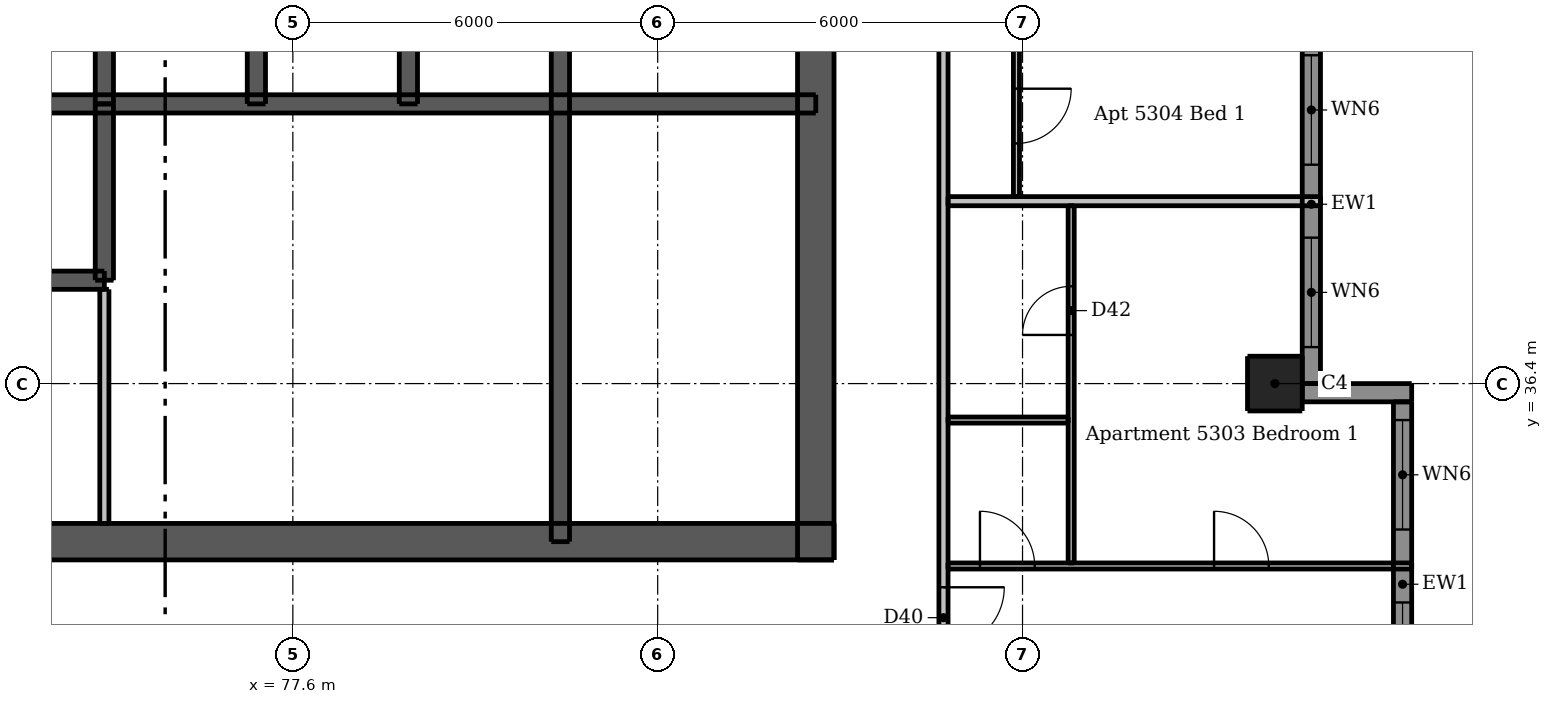
"""IFC4 building model, lengths in metres.
Left out: names, types, materials, properties, quantities, classifications, styles, units other than length and angle.
Written with IfcOpenShell. Run it as: python <this file> out.ifc"""

import sys

from ifc_helpers import new_model, si_unit, direction, frame, frame_2d, origin, origin_2d, place, context, subcontext, project, spatial, rectangle, extrude, element, fill, save


model = new_model("IFC4")
c1 = context("Model", 3, precision=1e-05, world=origin(), true_north=direction((0.0, 1.0)))
c2 = subcontext(c1, "Body", "Model", "MODEL_VIEW")
j1 = project(units=[si_unit("LENGTHUNIT", "METRE"), si_unit("PLANEANGLEUNIT", "RADIAN")], contexts=[c1])
p1 = place(None, origin())
s1 = spatial("IfcSite", under=j1, at=p1, CompositionType="ELEMENT")
p2 = place(p1, origin())
s2 = spatial("IfcBuilding", under=s1, at=p2, CompositionType="ELEMENT")
p3 = place(p2, frame((0.0, 0.0, 200.2)))
s3 = spatial("IfcBuildingStorey", under=s2, at=p3, CompositionType="ELEMENT", Elevation=200.2)
p4 = place(p3, frame((62.5, 33.8, 0.0), z_axis=(0.0, 0.0, 1.0), x_axis=(1.0, 0.0, 0.0)))
e1 = element("IfcWall", 1, at=p4, inside=s3, PredefinedType="SHEAR", context=c2, shape_type="SweptSolid", body=[
    extrude(rectangle(XDim=24.0, YDim=0.6, at=frame_2d((12.0, 0.0))), origin(), (0.0, 0.0, 1.0), 3.05),
])
p5 = place(p4, frame((1.925, 0.0, 0.0)))
e2 = element("IfcOpeningElement", 2, at=p5, cuts=e1, PredefinedType="OPENING", context=c2, shape_type="SweptSolid", body=[
    extrude(rectangle(XDim=1.1, YDim=2.1, at=frame_2d((0.55, 1.05))), frame((0.0, 0.31, 0.0), z_axis=(0.0, -1.0, 0.0), x_axis=(1.0, 0.0, 0.0)), (0.0, 0.0, 1.0), 0.62),
])
p6 = place(p4, frame((20.975, 0.0, 0.0)))
e3 = element("IfcOpeningElement", 3, at=p6, cuts=e1, PredefinedType="OPENING", context=c2, shape_type="SweptSolid", body=[
    extrude(rectangle(XDim=1.1, YDim=2.1, at=frame_2d((0.55, 1.05))), frame((0.0, 0.31, 0.0), z_axis=(0.0, -1.0, 0.0), x_axis=(1.0, 0.0, 0.0)), (0.0, 0.0, 1.0), 0.62),
])
p7 = place(p4, frame((8.0, 0.0, 0.0)))
e4 = element("IfcOpeningElement", 4, at=p7, cuts=e1, PredefinedType="OPENING", context=c2, shape_type="SweptSolid", body=[
    extrude(rectangle(XDim=1.1, YDim=2.1, at=frame_2d((0.55, 1.05))), frame((0.0, 0.31, 0.0), z_axis=(0.0, -1.0, 0.0), x_axis=(1.0, 0.0, 0.0)), (0.0, 0.0, 1.0), 0.62),
])
p8 = place(p4, frame((15.3, 0.0, 0.0)))
e5 = element("IfcOpeningElement", 5, at=p8, cuts=e1, PredefinedType="OPENING", context=c2, shape_type="SweptSolid", body=[
    extrude(rectangle(XDim=0.9, YDim=2.1, at=frame_2d((0.45, 1.05))), frame((0.0, 0.31, 0.0), z_axis=(0.0, -1.0, 0.0), x_axis=(1.0, 0.0, 0.0)), (0.0, 0.0, 1.0), 0.62),
])
p9 = place(p3, frame((86.2, 33.5, 0.0), z_axis=(0.0, 0.0, 1.0), x_axis=(0.0, 1.0, 0.0)))
e6 = element("IfcWall", 6, at=p9, inside=s3, PredefinedType="SHEAR", context=c2, shape_type="SweptSolid", body=[
    extrude(rectangle(XDim=24.0, YDim=0.6, at=frame_2d((12.0, 0.0))), origin(), (0.0, 0.0, 1.0), 3.05),
])
p10 = place(p9, frame((11.2, 0.0, 0.0)))
e7 = element("IfcOpeningElement", 7, at=p10, cuts=e6, PredefinedType="OPENING", context=c2, shape_type="SweptSolid", body=[
    extrude(rectangle(XDim=1.6, YDim=2.1, at=frame_2d((0.8, 1.05))), frame((0.0, 0.31, 0.0), z_axis=(0.0, -1.0, 0.0), x_axis=(1.0, 0.0, 0.0)), (0.0, 0.0, 1.0), 0.62),
])
p11 = place(p3, frame((62.8, 41.0, 0.0), z_axis=(0.0, 0.0, 1.0), x_axis=(1.0, 0.0, 0.0)))
e8 = element("IfcWall", 8, at=p11, inside=s3, PredefinedType="SHEAR", context=c2, shape_type="SweptSolid", body=[
    extrude(rectangle(XDim=23.4, YDim=0.3, at=frame_2d((11.7, 0.0))), origin(), (0.0, 0.0, 1.0), 3.05),
])
p12 = place(p3, frame((82.0, 33.8, 0.0), z_axis=(0.0, 0.0, 1.0), x_axis=(0.0, 1.0, 0.0)))
e9 = element("IfcWall", 9, at=p12, inside=s3, PredefinedType="SHEAR", context=c2, shape_type="SweptSolid", body=[
    extrude(rectangle(XDim=10.1, YDim=0.3, at=frame_2d((5.05, 0.0))), origin(), (0.0, 0.0, 1.0), 3.05),
])
for number, where, z_axis, x_axis in (
    (10, (74.5, 41.0, 0.0), (0.0, 0.0, 1.0), (0.0, 1.0, 0.0)),
    (11, (77.0, 41.0, 0.0), (0.0, 0.0, 1.0), (0.0, 1.0, 0.0)),
    (12, (79.5, 41.0, 0.0), (0.0, 0.0, 1.0), (0.0, 1.0, 0.0)),
):
    element("IfcWall", number, at=place(p3, frame(where, z_axis=z_axis, x_axis=x_axis)), inside=s3, PredefinedType="SHEAR", context=c2, shape_type="SweptSolid", body=[
        extrude(rectangle(XDim=2.9, YDim=0.3, at=frame_2d((1.45, 0.0))), origin(), (0.0, 0.0, 1.0), 3.05),
    ])
p13 = place(p3, frame((67.0, 38.1, 0.0), z_axis=(0.0, 0.0, 1.0), x_axis=(1.0, 0.0, 0.0)))
e13 = element("IfcWall", 13, at=p13, inside=s3, PredefinedType="SHEAR", context=c2, shape_type="SweptSolid", body=[
    extrude(rectangle(XDim=7.5, YDim=0.3, at=frame_2d((3.75, 0.0))), origin(), (0.0, 0.0, 1.0), 3.05),
])
p14 = place(p13, frame((0.7, 0.0, 0.0)))
e14 = element("IfcOpeningElement", 14, at=p14, cuts=e13, PredefinedType="OPENING", context=c2, shape_type="SweptSolid", body=[
    extrude(rectangle(XDim=1.1, YDim=2.1, at=frame_2d((0.55, 1.05))), frame((0.0, 0.16, 0.0), z_axis=(0.0, -1.0, 0.0), x_axis=(1.0, 0.0, 0.0)), (0.0, 0.0, 1.0), 0.32),
])
p15 = place(p13, frame((3.2, 0.0, 0.0)))
e15 = element("IfcOpeningElement", 15, at=p15, cuts=e13, PredefinedType="OPENING", context=c2, shape_type="SweptSolid", body=[
    extrude(rectangle(XDim=1.1, YDim=2.1, at=frame_2d((0.55, 1.05))), frame((0.0, 0.16, 0.0), z_axis=(0.0, -1.0, 0.0), x_axis=(1.0, 0.0, 0.0)), (0.0, 0.0, 1.0), 0.32),
])
p16 = place(p13, frame((5.65, 0.0, 0.0)))
e16 = element("IfcOpeningElement", 16, at=p16, cuts=e13, PredefinedType="OPENING", context=c2, shape_type="SweptSolid", body=[
    extrude(rectangle(XDim=1.2, YDim=2.1, at=frame_2d((0.6, 1.05))), frame((0.0, 0.16, 0.0), z_axis=(0.0, -1.0, 0.0), x_axis=(1.0, 0.0, 0.0)), (0.0, 0.0, 1.0), 0.32),
])
p17 = place(p3, frame((74.5, 38.1, 0.0), z_axis=(0.0, 0.0, 1.0), x_axis=(0.0, 1.0, 0.0)))
e17 = element("IfcWall", 17, at=p17, inside=s3, PredefinedType="SHEAR", context=c2, shape_type="SweptSolid", body=[
    extrude(rectangle(XDim=2.9, YDim=0.3, at=frame_2d((1.45, 0.0))), origin(), (0.0, 0.0, 1.0), 3.05),
])
p18 = place(p3, frame((93.75, 36.4, 0.0), z_axis=(0.0, 0.0, 1.0), x_axis=(1.0, 0.0, 0.0)))
e18 = element("IfcColumn", 18, at=p18, inside=s3, PredefinedType="COLUMN", context=c2, shape_type="SweptSolid", body=[
    extrude(rectangle(XDim=0.9, YDim=0.9, at=origin_2d()), origin(), (0.0, 0.0, 1.0), 3.05),
])
p19 = place(p3, frame((96.0, 36.25, 0.0), z_axis=(0.0, 0.0, 1.0), x_axis=(-1.0, 0.0, 0.0)))
e19 = element("IfcWall", 19, at=p19, inside=s3, PredefinedType="SOLIDWALL", context=c2, shape_type="SweptSolid", body=[
    extrude(rectangle(XDim=1.8, YDim=0.3, at=frame_2d((0.9, 0.0))), origin(), (0.0, 0.0, 1.0), 3.05),
])
p20 = place(p3, frame((95.85, 30.1, 0.0), z_axis=(0.0, 0.0, 1.0), x_axis=(0.0, 1.0, 0.0)))
e20 = element("IfcWall", 20, at=p20, inside=s3, PredefinedType="SOLIDWALL", context=c2, shape_type="SweptSolid", body=[
    extrude(rectangle(XDim=6.0, YDim=0.3, at=frame_2d((3.0, 0.0))), origin(), (0.0, 0.0, 1.0), 3.05),
])
p21 = place(p20, frame((0.9, 0.0, 0.15)))
e21 = element("IfcOpeningElement", 21, at=p21, cuts=e20, PredefinedType="OPENING", context=c2, shape_type="SweptSolid", body=[
    extrude(rectangle(XDim=1.8, YDim=2.1, at=frame_2d((0.9, 1.05))), frame((0.0, 0.16, 0.0), z_axis=(0.0, -1.0, 0.0), x_axis=(1.0, 0.0, 0.0)), (0.0, 0.0, 1.0), 0.32),
])
p22 = place(p20, frame((3.9, 0.0, 0.15)))
e22 = element("IfcOpeningElement", 22, at=p22, cuts=e20, PredefinedType="OPENING", context=c2, shape_type="SweptSolid", body=[
    extrude(rectangle(XDim=1.8, YDim=2.1, at=frame_2d((0.9, 1.05))), frame((0.0, 0.16, 0.0), z_axis=(0.0, -1.0, 0.0), x_axis=(1.0, 0.0, 0.0)), (0.0, 0.0, 1.0), 0.32),
])
p23 = place(p3, frame((94.35, 36.4, 0.0), z_axis=(0.0, 0.0, 1.0), x_axis=(0.0, 1.0, 0.0)))
e23 = element("IfcWall", 23, at=p23, inside=s3, PredefinedType="SOLIDWALL", context=c2, shape_type="SweptSolid", body=[
    extrude(rectangle(XDim=5.9, YDim=0.3, at=frame_2d((2.95, 0.0))), origin(), (0.0, 0.0, 1.0), 3.05),
])
p24 = place(p23, frame((0.6, 0.0, 0.15)))
e24 = element("IfcOpeningElement", 24, at=p24, cuts=e23, PredefinedType="OPENING", context=c2, shape_type="SweptSolid", body=[
    extrude(rectangle(XDim=1.8, YDim=2.1, at=frame_2d((0.9, 1.05))), frame((0.0, 0.16, 0.0), z_axis=(0.0, -1.0, 0.0), x_axis=(1.0, 0.0, 0.0)), (0.0, 0.0, 1.0), 0.32),
])
p25 = place(p23, frame((3.6, 0.0, 0.15)))
e25 = element("IfcOpeningElement", 25, at=p25, cuts=e23, PredefinedType="OPENING", context=c2, shape_type="SweptSolid", body=[
    extrude(rectangle(XDim=1.8, YDim=2.1, at=frame_2d((0.9, 1.05))), frame((0.0, 0.16, 0.0), z_axis=(0.0, -1.0, 0.0), x_axis=(1.0, 0.0, 0.0)), (0.0, 0.0, 1.0), 0.32),
])
p26 = place(p3, frame((74.5, 34.1, 0.0), z_axis=(0.0, 0.0, 1.0), x_axis=(0.0, 1.0, 0.0)))
e26 = element("IfcWall", 26, at=p26, inside=s3, PredefinedType="PLUMBINGWALL", context=c2, shape_type="SweptSolid", body=[
    extrude(rectangle(XDim=3.85, YDim=0.15, at=frame_2d((1.925, 0.0))), origin(), (0.0, 0.0, 1.0), 3.05),
])
p27 = place(p3, frame((89.5, 60.325, 0.0), z_axis=(0.0, 0.0, 1.0), x_axis=(0.0, -1.0, 0.0)))
e27 = element("IfcWall", 27, at=p27, inside=s3, PredefinedType="PARTITIONING", context=c2, shape_type="SweptSolid", body=[
    extrude(rectangle(XDim=20.85, YDim=0.1, at=frame_2d((10.425, 0.0))), origin(), (0.0, 0.0, 1.0), 2.51),
])
p28 = place(p27, frame((10.575, 0.0, 0.0)))
e28 = element("IfcOpeningElement", 28, at=p28, cuts=e27, PredefinedType="OPENING", context=c2, shape_type="SweptSolid", body=[
    extrude(rectangle(XDim=0.9, YDim=2.1, at=frame_2d((0.45, 1.05))), frame((0.0, 0.06, 0.0), z_axis=(0.0, -1.0, 0.0), x_axis=(1.0, 0.0, 0.0)), (0.0, 0.0, 1.0), 0.12),
])
p29 = place(p27, frame((6.675, 0.0, 0.0)))
e29 = element("IfcOpeningElement", 29, at=p29, cuts=e27, PredefinedType="OPENING", context=c2, shape_type="SweptSolid", body=[
    extrude(rectangle(XDim=0.9, YDim=2.1, at=frame_2d((0.45, 1.05))), frame((0.0, 0.06, 0.0), z_axis=(0.0, -1.0, 0.0), x_axis=(1.0, 0.0, 0.0)), (0.0, 0.0, 1.0), 0.12),
])
p30 = place(p27, frame((8.775, 0.0, 0.0)))
e30 = element("IfcOpeningElement", 30, at=p30, cuts=e27, PredefinedType="OPENING", context=c2, shape_type="SweptSolid", body=[
    extrude(rectangle(XDim=0.9, YDim=2.1, at=frame_2d((0.45, 1.05))), frame((0.0, 0.06, 0.0), z_axis=(0.0, -1.0, 0.0), x_axis=(1.0, 0.0, 0.0)), (0.0, 0.0, 1.0), 0.12),
])
p31 = place(p27, frame((19.075, 0.0, 0.0)))
e31 = element("IfcOpeningElement", 31, at=p31, cuts=e27, PredefinedType="OPENING", context=c2, shape_type="SweptSolid", body=[
    extrude(rectangle(XDim=0.9, YDim=2.1, at=frame_2d((0.45, 1.05))), frame((0.0, 0.06, 0.0), z_axis=(0.0, -1.0, 0.0), x_axis=(1.0, 0.0, 0.0)), (0.0, 0.0, 1.0), 0.12),
])
p32 = place(p27, frame((15.775, 0.0, 0.0)))
e32 = element("IfcOpeningElement", 32, at=p32, cuts=e27, PredefinedType="OPENING", context=c2, shape_type="SweptSolid", body=[
    extrude(rectangle(XDim=0.9, YDim=2.1, at=frame_2d((0.45, 1.05))), frame((0.0, 0.06, 0.0), z_axis=(0.0, -1.0, 0.0), x_axis=(1.0, 0.0, 0.0)), (0.0, 0.0, 1.0), 0.12),
])
p33 = place(p27, frame((1.275, 0.0, 0.0)))
e33 = element("IfcOpeningElement", 33, at=p33, cuts=e27, PredefinedType="OPENING", context=c2, shape_type="SweptSolid", body=[
    extrude(rectangle(XDim=0.9, YDim=2.1, at=frame_2d((0.45, 1.05))), frame((0.0, 0.06, 0.0), z_axis=(0.0, -1.0, 0.0), x_axis=(1.0, 0.0, 0.0)), (0.0, 0.0, 1.0), 0.12),
])
p34 = place(p27, frame((12.725, 0.0, 0.0)))
e34 = element("IfcOpeningElement", 34, at=p34, cuts=e27, PredefinedType="OPENING", context=c2, shape_type="SweptSolid", body=[
    extrude(rectangle(XDim=0.8, YDim=2.1, at=frame_2d((0.4, 1.05))), frame((0.0, 0.06, 0.0), z_axis=(0.0, -1.0, 0.0), x_axis=(1.0, 0.0, 0.0)), (0.0, 0.0, 1.0), 0.12),
])
p35 = place(p27, frame((4.325, 0.0, 0.0)))
e35 = element("IfcOpeningElement", 35, at=p35, cuts=e27, PredefinedType="OPENING", context=c2, shape_type="SweptSolid", body=[
    extrude(rectangle(XDim=0.8, YDim=2.1, at=frame_2d((0.4, 1.05))), frame((0.0, 0.06, 0.0), z_axis=(0.0, -1.0, 0.0), x_axis=(1.0, 0.0, 0.0)), (0.0, 0.0, 1.0), 0.12),
])
p36 = place(p3, frame((90.4, 33.45, 0.0), z_axis=(0.0, 0.0, 1.0), x_axis=(0.0, 1.0, 0.0)))
e36 = element("IfcWall", 36, at=p36, inside=s3, PredefinedType="PARTITIONING", context=c2, shape_type="SweptSolid", body=[
    extrude(rectangle(XDim=5.875, YDim=0.1, at=frame_2d((2.938, 0.0))), origin(), (0.0, 0.0, 1.0), 3.05),
])
p37 = place(p36, frame((3.75, 0.0, 0.0)))
e37 = element("IfcOpeningElement", 37, at=p37, cuts=e36, PredefinedType="OPENING", context=c2, shape_type="SweptSolid", body=[
    extrude(rectangle(XDim=0.8, YDim=2.1, at=frame_2d((0.4, 1.05))), frame((0.0, 0.06, 0.0), z_axis=(0.0, -1.0, 0.0), x_axis=(1.0, 0.0, 0.0)), (0.0, 0.0, 1.0), 0.12),
])
p38 = place(p3, frame((88.375, 35.8, 0.0), z_axis=(0.0, 0.0, 1.0), x_axis=(1.0, 0.0, 0.0)))
e38 = element("IfcWall", 38, at=p38, inside=s3, PredefinedType="PARTITIONING", context=c2, shape_type="SweptSolid", body=[
    extrude(rectangle(XDim=1.975, YDim=0.1, at=frame_2d((0.988, 0.0))), origin(), (0.0, 0.0, 1.0), 3.05),
])
p39 = place(p3, frame((88.375, 33.4, 0.0), z_axis=(0.0, 0.0, 1.0), x_axis=(1.0, 0.0, 0.0)))
e39 = element("IfcWall", 39, at=p39, inside=s3, PredefinedType="PARTITIONING", context=c2, shape_type="SweptSolid", body=[
    extrude(rectangle(XDim=7.625, YDim=0.1, at=frame_2d((3.812, 0.0))), origin(), (0.0, 0.0, 1.0), 3.05),
])
p40 = place(p39, frame((0.525, 0.0, 0.0)))
e40 = element("IfcOpeningElement", 40, at=p40, cuts=e39, PredefinedType="OPENING", context=c2, shape_type="SweptSolid", body=[
    extrude(rectangle(XDim=0.9, YDim=2.1, at=frame_2d((0.45, 1.05))), frame((0.0, 0.06, 0.0), z_axis=(0.0, -1.0, 0.0), x_axis=(1.0, 0.0, 0.0)), (0.0, 0.0, 1.0), 0.12),
])
p41 = place(p39, frame((4.375, 0.0, 0.0)))
e41 = element("IfcOpeningElement", 41, at=p41, cuts=e39, PredefinedType="OPENING", context=c2, shape_type="SweptSolid", body=[
    extrude(rectangle(XDim=0.9, YDim=2.1, at=frame_2d((0.45, 1.05))), frame((0.0, 0.06, 0.0), z_axis=(0.0, -1.0, 0.0), x_axis=(1.0, 0.0, 0.0)), (0.0, 0.0, 1.0), 0.12),
])
p42 = place(p3, frame((88.3, 61.175, 0.0), z_axis=(0.0, 0.0, 1.0), x_axis=(0.0, -1.0, 0.0)))
e42 = element("IfcWall", 42, at=p42, inside=s3, PredefinedType="PARTITIONING", context=c2, shape_type="SweptSolid", body=[
    extrude(rectangle(XDim=29.4, YDim=0.15, at=frame_2d((14.7, 0.0))), origin(), (0.0, 0.0, 1.0), 3.05),
])
p43 = place(p42, frame((28.125, 0.0, 0.0)))
e43 = element("IfcOpeningElement", 43, at=p43, cuts=e42, PredefinedType="OPENING", context=c2, shape_type="SweptSolid", body=[
    extrude(rectangle(XDim=1.0, YDim=2.1, at=frame_2d((0.5, 1.05))), frame((0.0, 0.085, 0.0), z_axis=(0.0, -1.0, 0.0), x_axis=(1.0, 0.0, 0.0)), (0.0, 0.0, 1.0), 0.17),
])
p44 = place(p42, frame((10.775, 0.0, 0.0)))
e44 = element("IfcOpeningElement", 44, at=p44, cuts=e42, PredefinedType="OPENING", context=c2, shape_type="SweptSolid", body=[
    extrude(rectangle(XDim=1.0, YDim=2.1, at=frame_2d((0.5, 1.05))), frame((0.0, 0.085, 0.0), z_axis=(0.0, -1.0, 0.0), x_axis=(1.0, 0.0, 0.0)), (0.0, 0.0, 1.0), 0.17),
])
p45 = place(p3, frame((88.375, 39.4, 0.0), z_axis=(0.0, 0.0, 1.0), x_axis=(1.0, 0.0, 0.0)))
e45 = element("IfcWall", 45, at=p45, inside=s3, PredefinedType="PARTITIONING", context=c2, shape_type="SweptSolid", body=[
    extrude(rectangle(XDim=6.125, YDim=0.15, at=frame_2d((3.062, 0.0))), origin(), (0.0, 0.0, 1.0), 3.05),
])
p46 = place(p21, origin())
e46 = element("IfcWindow", 46, at=p46, inside=s3, PartitioningType="DOUBLE_PANEL_VERTICAL", PredefinedType="WINDOW", context=c2, shape_type="SweptSolid", body=[
    extrude(rectangle(XDim=1.8, YDim=2.1, at=frame_2d((0.9, 1.05))), frame((0.0, 0.03, 0.0), z_axis=(0.0, -1.0, 0.0), x_axis=(1.0, 0.0, 0.0)), (0.0, 0.0, 1.0), 0.06),
])
fill(e21, e46)
p47 = place(p22, origin())
e47 = element("IfcWindow", 47, at=p47, inside=s3, PartitioningType="DOUBLE_PANEL_VERTICAL", PredefinedType="WINDOW", context=c2, shape_type="SweptSolid", body=[
    extrude(rectangle(XDim=1.8, YDim=2.1, at=frame_2d((0.9, 1.05))), frame((0.0, 0.03, 0.0), z_axis=(0.0, -1.0, 0.0), x_axis=(1.0, 0.0, 0.0)), (0.0, 0.0, 1.0), 0.06),
])
fill(e22, e47)
p48 = place(p24, origin())
e48 = element("IfcWindow", 48, at=p48, inside=s3, PartitioningType="DOUBLE_PANEL_VERTICAL", PredefinedType="WINDOW", context=c2, shape_type="SweptSolid", body=[
    extrude(rectangle(XDim=1.8, YDim=2.1, at=frame_2d((0.9, 1.05))), frame((0.0, 0.03, 0.0), z_axis=(0.0, -1.0, 0.0), x_axis=(1.0, 0.0, 0.0)), (0.0, 0.0, 1.0), 0.06),
])
fill(e24, e48)
p49 = place(p25, origin())
e49 = element("IfcWindow", 49, at=p49, inside=s3, PartitioningType="DOUBLE_PANEL_VERTICAL", PredefinedType="WINDOW", context=c2, shape_type="SweptSolid", body=[
    extrude(rectangle(XDim=1.8, YDim=2.1, at=frame_2d((0.9, 1.05))), frame((0.0, 0.03, 0.0), z_axis=(0.0, -1.0, 0.0), x_axis=(1.0, 0.0, 0.0)), (0.0, 0.0, 1.0), 0.06),
])
fill(e25, e49)
p50 = place(p6, origin())
e50 = element("IfcDoor", 50, at=p50, inside=s3, OperationType="SINGLE_SWING_RIGHT", PredefinedType="DOOR", context=c2, shape_type="SweptSolid", body=[
    extrude(rectangle(XDim=1.1, YDim=2.1, at=frame_2d((0.55, 1.05))), frame((0.0, 0.288, 0.0), z_axis=(0.0, -1.0, 0.0), x_axis=(1.0, 0.0, 0.0)), (0.0, 0.0, 1.0), 0.05),
])
fill(e3, e50)
p51 = place(p8, origin())
e51 = element("IfcDoor", 51, at=p51, inside=s3, OperationType="SINGLE_SWING_LEFT", PredefinedType="DOOR", context=c2, shape_type="SweptSolid", body=[
    extrude(rectangle(XDim=0.9, YDim=2.1, at=frame_2d((0.45, 1.05))), frame((0.0, 0.288, 0.0), z_axis=(0.0, -1.0, 0.0), x_axis=(1.0, 0.0, 0.0)), (0.0, 0.0, 1.0), 0.05),
])
fill(e5, e51)
p52 = place(p16, origin())
e52 = element("IfcDoor", 52, at=p52, inside=s3, OperationType="DOUBLE_DOOR_SLIDING", PredefinedType="DOOR", context=c2, shape_type="SweptSolid", body=[
    extrude(rectangle(XDim=1.2, YDim=2.1, at=frame_2d((0.6, 1.05))), frame((0.0, 0.025, 0.0), z_axis=(0.0, -1.0, 0.0), x_axis=(1.0, 0.0, 0.0)), (0.0, 0.0, 1.0), 0.05),
])
fill(e16, e52)
p53 = place(p43, origin())
e53 = element("IfcDoor", 53, at=p53, inside=s3, OperationType="SINGLE_SWING_LEFT", PredefinedType="DOOR", context=c2, shape_type="SweptSolid", body=[
    extrude(rectangle(XDim=1.0, YDim=2.1, at=frame_2d((0.5, 1.05))), frame((0.0, 0.025, 0.0), z_axis=(0.0, -1.0, 0.0), x_axis=(1.0, 0.0, 0.0)), (0.0, 0.0, 1.0), 0.05),
])
fill(e43, e53)
p54 = place(p40, origin())
e54 = element("IfcDoor", 54, at=p54, inside=s3, OperationType="SINGLE_SWING_LEFT", PredefinedType="DOOR", context=c2, shape_type="SweptSolid", body=[
    extrude(rectangle(XDim=0.9, YDim=2.1, at=frame_2d((0.45, 1.05))), frame((0.0, 0.025, 0.0), z_axis=(0.0, -1.0, 0.0), x_axis=(1.0, 0.0, 0.0)), (0.0, 0.0, 1.0), 0.05),
])
fill(e40, e54)
p55 = place(p41, origin())
e55 = element("IfcDoor", 55, at=p55, inside=s3, OperationType="SINGLE_SWING_LEFT", PredefinedType="DOOR", context=c2, shape_type="SweptSolid", body=[
    extrude(rectangle(XDim=0.9, YDim=2.1, at=frame_2d((0.45, 1.05))), frame((0.0, 0.025, 0.0), z_axis=(0.0, -1.0, 0.0), x_axis=(1.0, 0.0, 0.0)), (0.0, 0.0, 1.0), 0.05),
])
fill(e41, e55)
p56 = place(p37, origin())
e56 = element("IfcDoor", 56, at=p56, inside=s3, OperationType="SINGLE_SWING_LEFT", PredefinedType="DOOR", context=c2, shape_type="SweptSolid", body=[
    extrude(rectangle(XDim=0.8, YDim=2.1, at=frame_2d((0.4, 1.05))), frame((0.0, 0.025, 0.0), z_axis=(0.0, -1.0, 0.0), x_axis=(1.0, 0.0, 0.0)), (0.0, 0.0, 1.0), 0.05),
])
fill(e37, e56)
p57 = place(p31, origin())
e57 = element("IfcDoor", 57, at=p57, inside=s3, OperationType="SINGLE_SWING_LEFT", PredefinedType="DOOR", context=c2, shape_type="SweptSolid", body=[
    extrude(rectangle(XDim=0.9, YDim=2.1, at=frame_2d((0.45, 1.05))), frame((0.0, 0.025, 0.0), z_axis=(0.0, -1.0, 0.0), x_axis=(1.0, 0.0, 0.0)), (0.0, 0.0, 1.0), 0.05),
])
fill(e31, e57)
save(model, sys.argv[1])
